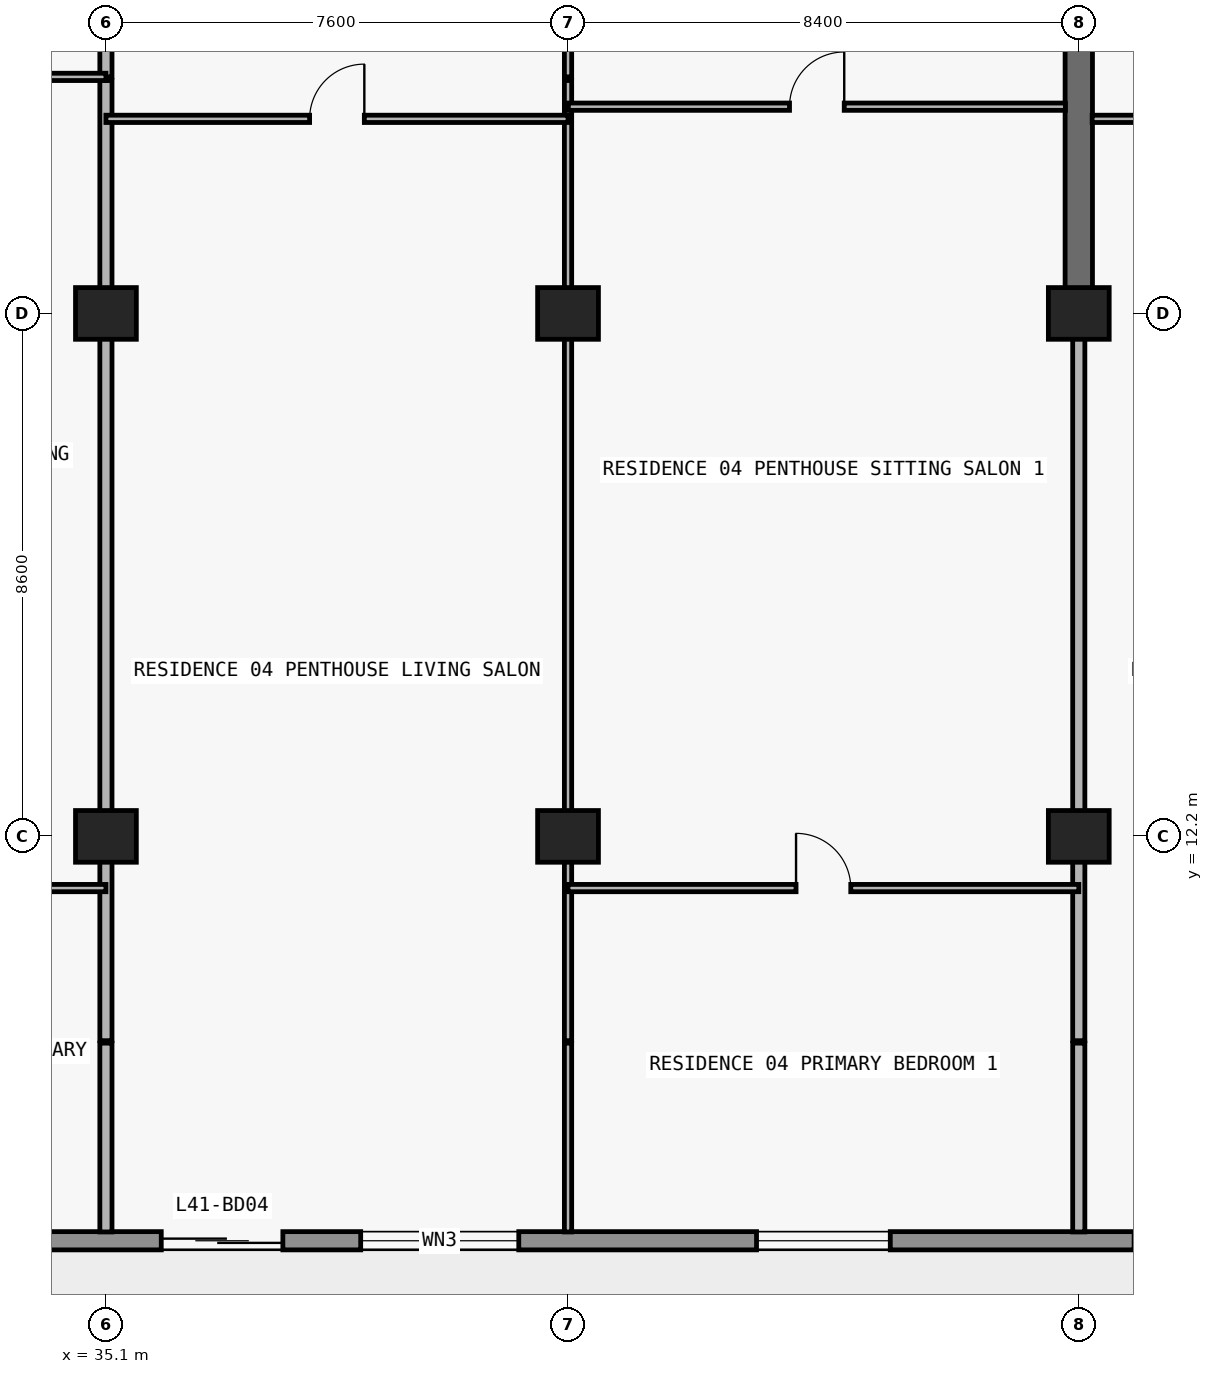
"""IFC4 building model, lengths in metres.
Left out: names, types, materials, properties, quantities, classifications, styles, units other than length and angle.
Written with IfcOpenShell. Run it as: python <this file> out.ifc"""

import sys

from ifc_helpers import new_model, si_unit, direction, frame, frame_2d, origin, origin_2d, place, context, subcontext, project, spatial, rectangle, extrude, element, fill, save


model = new_model("IFC4")
c1 = context("Model", 3, precision=1e-05, world=origin(), true_north=direction((0.0, 1.0)))
c2 = subcontext(c1, "Body", "Model", "MODEL_VIEW")
j1 = project(units=[si_unit("LENGTHUNIT", "METRE"), si_unit("PLANEANGLEUNIT", "RADIAN")], contexts=[c1])
p1 = place(None, origin())
s1 = spatial("IfcSite", under=j1, at=p1, CompositionType="ELEMENT")
p2 = place(p1, origin())
s2 = spatial("IfcBuilding", under=s1, at=p2, CompositionType="ELEMENT")
p3 = place(p2, frame((0.0, 0.0, 148.8)))
s3 = spatial("IfcBuildingStorey", under=s2, at=p3, CompositionType="ELEMENT", Elevation=148.8)
for number, where, z_axis, x_axis in (
    (1, (35.1, 12.2, 0.0), (0.0, 0.0, 1.0), (1.0, 0.0, 0.0)),
    (2, (42.7, 12.2, 0.0), (0.0, 0.0, 1.0), (1.0, 0.0, 0.0)),
    (3, (51.1, 12.2, 0.0), (0.0, 0.0, 1.0), (1.0, 0.0, 0.0)),
    (4, (35.1, 20.8, 0.0), (0.0, 0.0, 1.0), (1.0, 0.0, 0.0)),
    (5, (42.7, 20.8, 0.0), (0.0, 0.0, 1.0), (1.0, 0.0, 0.0)),
    (6, (51.1, 20.8, 0.0), (0.0, 0.0, 1.0), (1.0, 0.0, 0.0)),
):
    element("IfcColumn", number, at=place(p3, frame(where, z_axis=z_axis, x_axis=x_axis)), inside=s3, PredefinedType="COLUMN", context=c2, shape_type="SweptSolid", body=[
        extrude(rectangle(XDim=1.0, YDim=0.85, at=origin_2d()), origin(), (0.0, 0.0, 1.0), 3.0),
    ])
p4 = place(p3, frame((51.1, 20.8, 0.0), z_axis=(0.0, 0.0, 1.0), x_axis=(0.0, 1.0, 0.0)))
e7 = element("IfcWall", 7, at=p4, inside=s3, PredefinedType="SHEAR", context=c2, shape_type="SweptSolid", body=[
    extrude(rectangle(XDim=8.6, YDim=0.45, at=frame_2d((4.3, 0.0))), origin(), (0.0, 0.0, 1.0), 3.0),
])
p5 = place(p3, frame((70.1, 5.55, 0.0), z_axis=(0.0, 0.0, 1.0), x_axis=(-1.0, 0.0, 0.0)))
e8 = element("IfcWall", 8, at=p5, inside=s3, PredefinedType="STANDARD", context=c2, shape_type="SweptSolid", body=[
    extrude(rectangle(XDim=62.4, YDim=0.3, at=frame_2d((31.2, 0.0))), origin(), (0.0, 0.0, 1.0), 3.0),
])
p6 = place(p5, frame((57.226, 0.0, 0.0)))
e9 = element("IfcOpeningElement", 9, at=p6, cuts=e8, PredefinedType="OPENING", context=c2, shape_type="SweptSolid", body=[
    extrude(rectangle(XDim=2.0, YDim=2.3, at=frame_2d((1.0, 1.15))), frame((0.0, 0.16, 0.0), z_axis=(0.0, -1.0, 0.0), x_axis=(1.0, 0.0, 0.0)), (0.0, 0.0, 1.0), 0.32),
])
p7 = place(p5, frame((52.926, 0.0, 0.85)))
e10 = element("IfcOpeningElement", 10, at=p7, cuts=e8, PredefinedType="OPENING", context=c2, shape_type="SweptSolid", body=[
    extrude(rectangle(XDim=2.2, YDim=1.55, at=frame_2d((1.1, 0.775))), frame((0.0, 0.16, 0.0), z_axis=(0.0, -1.0, 0.0), x_axis=(1.0, 0.0, 0.0)), (0.0, 0.0, 1.0), 0.32),
])
p8 = place(p5, frame((48.49, 0.0, 0.0)))
e11 = element("IfcOpeningElement", 11, at=p8, cuts=e8, PredefinedType="OPENING", context=c2, shape_type="SweptSolid", body=[
    extrude(rectangle(XDim=2.0, YDim=2.3, at=frame_2d((1.0, 1.15))), frame((0.0, 0.16, 0.0), z_axis=(0.0, -1.0, 0.0), x_axis=(1.0, 0.0, 0.0)), (0.0, 0.0, 1.0), 0.32),
])
p9 = place(p5, frame((44.39, 0.0, 0.85)))
e12 = element("IfcOpeningElement", 12, at=p9, cuts=e8, PredefinedType="OPENING", context=c2, shape_type="SweptSolid", body=[
    extrude(rectangle(XDim=1.8, YDim=1.55, at=frame_2d((0.9, 0.775))), frame((0.0, 0.16, 0.0), z_axis=(0.0, -1.0, 0.0), x_axis=(1.0, 0.0, 0.0)), (0.0, 0.0, 1.0), 0.32),
])
p10 = place(p5, frame((40.426, 0.0, 0.0)))
e13 = element("IfcOpeningElement", 13, at=p10, cuts=e8, PredefinedType="OPENING", context=c2, shape_type="SweptSolid", body=[
    extrude(rectangle(XDim=2.0, YDim=2.3, at=frame_2d((1.0, 1.15))), frame((0.0, 0.16, 0.0), z_axis=(0.0, -1.0, 0.0), x_axis=(1.0, 0.0, 0.0)), (0.0, 0.0, 1.0), 0.32),
])
p11 = place(p5, frame((36.126, 0.0, 0.85)))
e14 = element("IfcOpeningElement", 14, at=p11, cuts=e8, PredefinedType="OPENING", context=c2, shape_type="SweptSolid", body=[
    extrude(rectangle(XDim=2.2, YDim=1.55, at=frame_2d((1.1, 0.775))), frame((0.0, 0.16, 0.0), z_axis=(0.0, -1.0, 0.0), x_axis=(1.0, 0.0, 0.0)), (0.0, 0.0, 1.0), 0.32),
])
p12 = place(p5, frame((32.09, 0.0, 0.0)))
e15 = element("IfcOpeningElement", 15, at=p12, cuts=e8, PredefinedType="OPENING", context=c2, shape_type="SweptSolid", body=[
    extrude(rectangle(XDim=2.0, YDim=2.3, at=frame_2d((1.0, 1.15))), frame((0.0, 0.16, 0.0), z_axis=(0.0, -1.0, 0.0), x_axis=(1.0, 0.0, 0.0)), (0.0, 0.0, 1.0), 0.32),
])
p13 = place(p5, frame((28.21, 0.0, 0.65)))
e16 = element("IfcOpeningElement", 16, at=p13, cuts=e8, PredefinedType="OPENING", context=c2, shape_type="SweptSolid", body=[
    extrude(rectangle(XDim=2.6, YDim=1.85, at=frame_2d((1.3, 0.925))), frame((0.0, 0.16, 0.0), z_axis=(0.0, -1.0, 0.0), x_axis=(1.0, 0.0, 0.0)), (0.0, 0.0, 1.0), 0.32),
])
p14 = place(p5, frame((22.1, 0.0, 0.85)))
e17 = element("IfcOpeningElement", 17, at=p14, cuts=e8, PredefinedType="OPENING", context=c2, shape_type="SweptSolid", body=[
    extrude(rectangle(XDim=2.2, YDim=1.55, at=frame_2d((1.1, 0.775))), frame((0.0, 0.16, 0.0), z_axis=(0.0, -1.0, 0.0), x_axis=(1.0, 0.0, 0.0)), (0.0, 0.0, 1.0), 0.32),
])
p15 = place(p5, frame((16.09, 0.0, 0.0)))
e18 = element("IfcOpeningElement", 18, at=p15, cuts=e8, PredefinedType="OPENING", context=c2, shape_type="SweptSolid", body=[
    extrude(rectangle(XDim=2.0, YDim=2.3, at=frame_2d((1.0, 1.15))), frame((0.0, 0.16, 0.0), z_axis=(0.0, -1.0, 0.0), x_axis=(1.0, 0.0, 0.0)), (0.0, 0.0, 1.0), 0.32),
])
p16 = place(p5, frame((11.41, 0.0, 0.65)))
e19 = element("IfcOpeningElement", 19, at=p16, cuts=e8, PredefinedType="OPENING", context=c2, shape_type="SweptSolid", body=[
    extrude(rectangle(XDim=2.6, YDim=1.85, at=frame_2d((1.3, 0.925))), frame((0.0, 0.16, 0.0), z_axis=(0.0, -1.0, 0.0), x_axis=(1.0, 0.0, 0.0)), (0.0, 0.0, 1.0), 0.32),
])
p17 = place(p5, frame((5.3, 0.0, 0.85)))
e20 = element("IfcOpeningElement", 20, at=p17, cuts=e8, PredefinedType="OPENING", context=c2, shape_type="SweptSolid", body=[
    extrude(rectangle(XDim=2.2, YDim=1.55, at=frame_2d((1.1, 0.775))), frame((0.0, 0.16, 0.0), z_axis=(0.0, -1.0, 0.0), x_axis=(1.0, 0.0, 0.0)), (0.0, 0.0, 1.0), 0.32),
])
p18 = place(p3, frame((35.1, 5.695, 0.0), z_axis=(0.0, 0.0, 1.0), x_axis=(0.0, 1.0, 0.0)))
e21 = element("IfcWall", 21, at=p18, inside=s3, PredefinedType="PARTITIONING", context=c2, shape_type="SweptSolid", body=[
    extrude(rectangle(XDim=3.105, YDim=0.2, at=frame_2d((1.552, 0.0))), origin(), (0.0, 0.0, 1.0), 3.0),
])
p19 = place(p3, frame((35.1, 8.84, 0.0), z_axis=(0.0, 0.0, 1.0), x_axis=(0.0, 1.0, 0.0)))
e22 = element("IfcWall", 22, at=p19, inside=s3, PredefinedType="PARTITIONING", context=c2, shape_type="SweptSolid", body=[
    extrude(rectangle(XDim=15.79, YDim=0.2, at=frame_2d((7.895, 0.0))), origin(), (0.0, 0.0, 1.0), 2.124),
])
p20 = place(p3, frame((35.1, 24.69, 0.0), z_axis=(0.0, 0.0, 1.0), x_axis=(0.0, 1.0, 0.0)))
e23 = element("IfcWall", 23, at=p20, inside=s3, PredefinedType="PARTITIONING", context=c2, shape_type="SweptSolid", body=[
    extrude(rectangle(XDim=5.09, YDim=0.2, at=frame_2d((2.545, 0.0))), origin(), (0.0, 0.0, 1.0), 2.124),
])
p21 = place(p3, frame((42.7, 5.695, 0.0), z_axis=(0.0, 0.0, 1.0), x_axis=(0.0, 1.0, 0.0)))
e24 = element("IfcWall", 24, at=p21, inside=s3, PredefinedType="PARTITIONING", context=c2, shape_type="SweptSolid", body=[
    extrude(rectangle(XDim=3.105, YDim=0.12, at=frame_2d((1.552, 0.0))), origin(), (0.0, 0.0, 1.0), 3.0),
])
p22 = place(p3, frame((42.7, 8.84, 0.0), z_axis=(0.0, 0.0, 1.0), x_axis=(0.0, 1.0, 0.0)))
e25 = element("IfcWall", 25, at=p22, inside=s3, PredefinedType="PARTITIONING", context=c2, shape_type="SweptSolid", body=[
    extrude(rectangle(XDim=15.79, YDim=0.12, at=frame_2d((7.895, 0.0))), origin(), (0.0, 0.0, 1.0), 2.124),
])
p23 = place(p3, frame((42.7, 24.69, 0.0), z_axis=(0.0, 0.0, 1.0), x_axis=(0.0, 1.0, 0.0)))
e26 = element("IfcWall", 26, at=p23, inside=s3, PredefinedType="PARTITIONING", context=c2, shape_type="SweptSolid", body=[
    extrude(rectangle(XDim=5.09, YDim=0.12, at=frame_2d((2.545, 0.0))), origin(), (0.0, 0.0, 1.0), 2.124),
])
p24 = place(p23, frame((1.505, 0.0, 0.0)))
e27 = element("IfcOpeningElement", 27, at=p24, cuts=e26, PredefinedType="OPENING", context=c2, shape_type="SweptSolid", body=[
    extrude(rectangle(XDim=0.9, YDim=2.074, at=frame_2d((0.45, 1.037))), frame((0.0, 0.07, 0.0), z_axis=(0.0, -1.0, 0.0), x_axis=(1.0, 0.0, 0.0)), (0.0, 0.0, 1.0), 0.14),
])
p25 = place(p3, frame((51.1, 5.695, 0.0), z_axis=(0.0, 0.0, 1.0), x_axis=(0.0, 1.0, 0.0)))
e28 = element("IfcWall", 28, at=p25, inside=s3, PredefinedType="PARTITIONING", context=c2, shape_type="SweptSolid", body=[
    extrude(rectangle(XDim=3.105, YDim=0.2, at=frame_2d((1.552, 0.0))), origin(), (0.0, 0.0, 1.0), 3.0),
])
p26 = place(p3, frame((51.1, 8.84, 0.0), z_axis=(0.0, 0.0, 1.0), x_axis=(0.0, 1.0, 0.0)))
e29 = element("IfcWall", 29, at=p26, inside=s3, PredefinedType="PARTITIONING", context=c2, shape_type="SweptSolid", body=[
    extrude(rectangle(XDim=11.955, YDim=0.2, at=frame_2d((5.978, 0.0))), origin(), (0.0, 0.0, 1.0), 2.124),
])
p27 = place(p3, frame((30.648, 11.35, 0.0), z_axis=(0.0, 0.0, 1.0), x_axis=(1.0, 0.0, 0.0)))
e30 = element("IfcWall", 30, at=p27, inside=s3, PredefinedType="PARTITIONING", context=c2, shape_type="SweptSolid", body=[
    extrude(rectangle(XDim=4.452, YDim=0.12, at=frame_2d((2.226, 0.0))), origin(), (0.0, 0.0, 1.0), 3.0),
])
p28 = place(p27, frame((1.776, 0.0, 0.0)))
e31 = element("IfcOpeningElement", 31, at=p28, cuts=e30, PredefinedType="OPENING", context=c2, shape_type="SweptSolid", body=[
    extrude(rectangle(XDim=0.9, YDim=2.15, at=frame_2d((0.45, 1.075))), frame((0.0, 0.07, 0.0), z_axis=(0.0, -1.0, 0.0), x_axis=(1.0, 0.0, 0.0)), (0.0, 0.0, 1.0), 0.14),
])
p29 = place(p3, frame((42.7, 11.35, 0.0), z_axis=(0.0, 0.0, 1.0), x_axis=(1.0, 0.0, 0.0)))
e32 = element("IfcWall", 32, at=p29, inside=s3, PredefinedType="PARTITIONING", context=c2, shape_type="SweptSolid", body=[
    extrude(rectangle(XDim=8.4, YDim=0.12, at=frame_2d((4.2, 0.0))), origin(), (0.0, 0.0, 1.0), 3.0),
])
p30 = place(p29, frame((3.75, 0.0, 0.0)))
e33 = element("IfcOpeningElement", 33, at=p30, cuts=e32, PredefinedType="OPENING", context=c2, shape_type="SweptSolid", body=[
    extrude(rectangle(XDim=0.9, YDim=2.15, at=frame_2d((0.45, 1.075))), frame((0.0, 0.07, 0.0), z_axis=(0.0, -1.0, 0.0), x_axis=(1.0, 0.0, 0.0)), (0.0, 0.0, 1.0), 0.14),
])
p31 = place(p3, frame((35.1, 24.0, 0.0), z_axis=(0.0, 0.0, 1.0), x_axis=(1.0, 0.0, 0.0)))
e34 = element("IfcWall", 34, at=p31, inside=s3, PredefinedType="PARTITIONING", context=c2, shape_type="SweptSolid", body=[
    extrude(rectangle(XDim=7.6, YDim=0.12, at=frame_2d((3.8, 0.0))), origin(), (0.0, 0.0, 1.0), 3.0),
])
p32 = place(p31, frame((3.35, 0.0, 0.0)))
e35 = element("IfcOpeningElement", 35, at=p32, cuts=e34, PredefinedType="OPENING", context=c2, shape_type="SweptSolid", body=[
    extrude(rectangle(XDim=0.9, YDim=2.15, at=frame_2d((0.45, 1.075))), frame((0.0, 0.07, 0.0), z_axis=(0.0, -1.0, 0.0), x_axis=(1.0, 0.0, 0.0)), (0.0, 0.0, 1.0), 0.14),
])
p33 = place(p3, frame((51.32, 24.0, 0.0), z_axis=(0.0, 0.0, 1.0), x_axis=(1.0, 0.0, 0.0)))
e36 = element("IfcWall", 36, at=p33, inside=s3, PredefinedType="PARTITIONING", context=c2, shape_type="SweptSolid", body=[
    extrude(rectangle(XDim=8.18, YDim=0.12, at=frame_2d((4.09, 0.0))), origin(), (0.0, 0.0, 1.0), 3.0),
])
p34 = place(p33, frame((1.33, 0.0, 0.0)))
e37 = element("IfcOpeningElement", 37, at=p34, cuts=e36, PredefinedType="OPENING", context=c2, shape_type="SweptSolid", body=[
    extrude(rectangle(XDim=0.9, YDim=2.15, at=frame_2d((0.45, 1.075))), frame((0.0, 0.07, 0.0), z_axis=(0.0, -1.0, 0.0), x_axis=(1.0, 0.0, 0.0)), (0.0, 0.0, 1.0), 0.14),
])
p35 = place(p3, frame((42.705, 24.2, 0.0), z_axis=(0.0, 0.0, 1.0), x_axis=(1.0, 0.0, 0.0)))
e38 = element("IfcWall", 38, at=p35, inside=s3, PredefinedType="PARTITIONING", context=c2, shape_type="SweptSolid", body=[
    extrude(rectangle(XDim=8.175, YDim=0.12, at=frame_2d((4.087, 0.0))), origin(), (0.0, 0.0, 1.0), 3.0),
])
p36 = place(p35, frame((3.637, 0.0, 0.0)))
e39 = element("IfcOpeningElement", 39, at=p36, cuts=e38, PredefinedType="OPENING", context=c2, shape_type="SweptSolid", body=[
    extrude(rectangle(XDim=0.9, YDim=2.15, at=frame_2d((0.45, 1.075))), frame((0.0, 0.07, 0.0), z_axis=(0.0, -1.0, 0.0), x_axis=(1.0, 0.0, 0.0)), (0.0, 0.0, 1.0), 0.14),
])
p37 = place(p3, frame((26.92, 24.69, 0.0), z_axis=(0.0, 0.0, 1.0), x_axis=(1.0, 0.0, 0.0)))
e40 = element("IfcWall", 40, at=p37, inside=s3, PredefinedType="PARTITIONING", context=c2, shape_type="SweptSolid", body=[
    extrude(rectangle(XDim=8.18, YDim=0.12, at=frame_2d((4.09, 0.0))), origin(), (0.0, 0.0, 1.0), 3.0),
])
p38 = place(p37, frame((1.414, 0.0, 0.0)))
e41 = element("IfcOpeningElement", 41, at=p38, cuts=e40, PredefinedType="OPENING", context=c2, shape_type="SweptSolid", body=[
    extrude(rectangle(XDim=0.9, YDim=2.15, at=frame_2d((0.45, 1.075))), frame((0.0, 0.07, 0.0), z_axis=(0.0, -1.0, 0.0), x_axis=(1.0, 0.0, 0.0)), (0.0, 0.0, 1.0), 0.14),
])
p39 = place(p37, frame((5.673, 0.0, 0.0)))
e42 = element("IfcOpeningElement", 42, at=p39, cuts=e40, PredefinedType="OPENING", context=c2, shape_type="SweptSolid", body=[
    extrude(rectangle(XDim=0.9, YDim=2.15, at=frame_2d((0.45, 1.075))), frame((0.0, 0.07, 0.0), z_axis=(0.0, -1.0, 0.0), x_axis=(1.0, 0.0, 0.0)), (0.0, 0.0, 1.0), 0.14),
])
p40 = place(p12, origin())
e43 = element("IfcDoor", 43, at=p40, inside=s3, OperationType="DOUBLE_DOOR_SLIDING", PredefinedType="DOOR", context=c2, shape_type="SweptSolid", body=[
    extrude(rectangle(XDim=2.0, YDim=2.3, at=frame_2d((1.0, 1.15))), frame((0.0, 0.025, 0.0), z_axis=(0.0, -1.0, 0.0), x_axis=(1.0, 0.0, 0.0)), (0.0, 0.0, 1.0), 0.05),
])
fill(e15, e43)
p41 = place(p13, origin())
e44 = element("IfcWindow", 44, at=p41, inside=s3, PartitioningType="SINGLE_PANEL", PredefinedType="WINDOW", context=c2, shape_type="SweptSolid", body=[
    extrude(rectangle(XDim=2.6, YDim=1.85, at=frame_2d((1.3, 0.925))), frame((0.0, 0.03, 0.0), z_axis=(0.0, -1.0, 0.0), x_axis=(1.0, 0.0, 0.0)), (0.0, 0.0, 1.0), 0.06),
])
fill(e16, e44)
p42 = place(p14, origin())
e45 = element("IfcWindow", 45, at=p42, inside=s3, PartitioningType="SINGLE_PANEL", PredefinedType="WINDOW", context=c2, shape_type="SweptSolid", body=[
    extrude(rectangle(XDim=2.2, YDim=1.55, at=frame_2d((1.1, 0.775))), frame((0.0, 0.03, 0.0), z_axis=(0.0, -1.0, 0.0), x_axis=(1.0, 0.0, 0.0)), (0.0, 0.0, 1.0), 0.06),
])
fill(e17, e45)
p43 = place(p32, origin())
e46 = element("IfcDoor", 46, at=p43, inside=s3, OperationType="SINGLE_SWING_RIGHT", PredefinedType="DOOR", context=c2, shape_type="SweptSolid", body=[
    extrude(rectangle(XDim=0.9, YDim=2.15, at=frame_2d((0.45, 1.075))), frame((0.0, 0.025, 0.0), z_axis=(0.0, -1.0, 0.0), x_axis=(1.0, 0.0, 0.0)), (0.0, 0.0, 1.0), 0.05),
])
fill(e35, e46)
p44 = place(p36, origin())
e47 = element("IfcDoor", 47, at=p44, inside=s3, OperationType="SINGLE_SWING_RIGHT", PredefinedType="DOOR", context=c2, shape_type="SweptSolid", body=[
    extrude(rectangle(XDim=0.9, YDim=2.15, at=frame_2d((0.45, 1.075))), frame((0.0, 0.025, 0.0), z_axis=(0.0, -1.0, 0.0), x_axis=(1.0, 0.0, 0.0)), (0.0, 0.0, 1.0), 0.05),
])
fill(e39, e47)
p45 = place(p30, origin())
e48 = element("IfcDoor", 48, at=p45, inside=s3, OperationType="SINGLE_SWING_LEFT", PredefinedType="DOOR", context=c2, shape_type="SweptSolid", body=[
    extrude(rectangle(XDim=0.9, YDim=2.15, at=frame_2d((0.45, 1.075))), frame((0.0, 0.025, 0.0), z_axis=(0.0, -1.0, 0.0), x_axis=(1.0, 0.0, 0.0)), (0.0, 0.0, 1.0), 0.05),
])
fill(e33, e48)
save(model, sys.argv[1])
